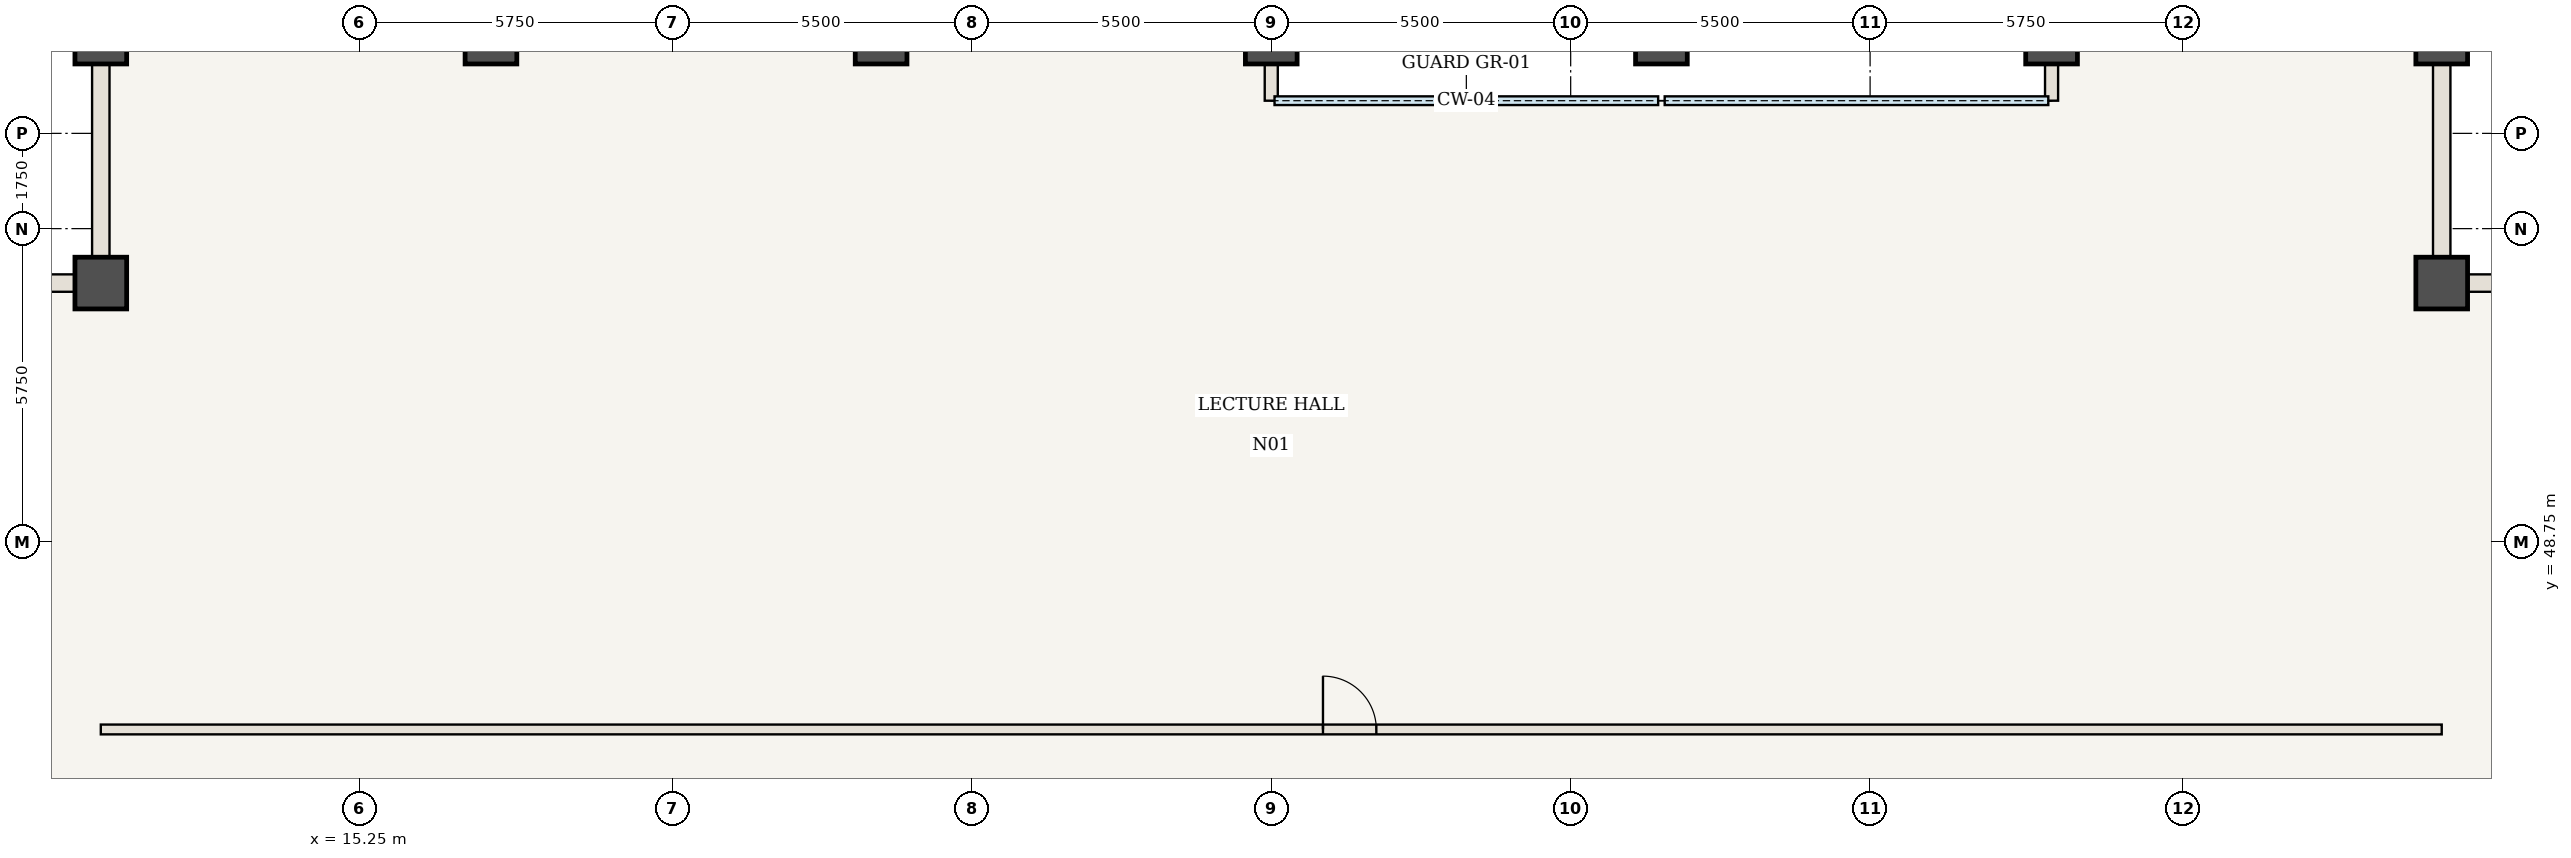
"""IFC4 building model, lengths in metres.
Left out: names, types, materials, properties, quantities, classifications, styles, units other than length and angle.
Written with IfcOpenShell. Run it as: python <this file> out.ifc"""

import sys

from ifc_helpers import new_model, si_unit, direction, frame, frame_2d, origin, origin_2d, place, context, subcontext, project, spatial, rectangle, extrude, element, fill, save


model = new_model("IFC4")
c1 = context("Model", 3, precision=1e-05, world=origin(), true_north=direction((0.0, 1.0)))
c2 = subcontext(c1, "Body", "Model", "MODEL_VIEW")
j1 = project(units=[si_unit("LENGTHUNIT", "METRE"), si_unit("PLANEANGLEUNIT", "RADIAN")], contexts=[c1])
p1 = place(None, origin())
s1 = spatial("IfcSite", under=j1, at=p1, CompositionType="ELEMENT")
p2 = place(p1, origin())
s2 = spatial("IfcBuilding", under=s1, at=p2, CompositionType="ELEMENT")
p3 = place(p2, frame((0.0, 0.0, 133.7)))
s3 = spatial("IfcBuildingStorey", under=s2, at=p3, CompositionType="ELEMENT", Elevation=133.7)
for number, where, z_axis, x_axis in (
    (1, (53.5, 53.5, 0.0), (0.0, 0.0, 1.0), (1.0, 0.0, 0.0)),
    (2, (53.5, 58.0, 0.0), (0.0, 0.0, 1.0), (1.0, 0.0, 0.0)),
    (3, (10.5, 58.0, 0.0), (0.0, 0.0, 1.0), (1.0, 0.0, 0.0)),
    (4, (10.5, 53.5, 0.0), (0.0, 0.0, 1.0), (1.0, 0.0, 0.0)),
    (5, (17.667, 58.0, 0.0), (0.0, 0.0, 1.0), (1.0, 0.0, 0.0)),
    (6, (24.833, 58.0, 0.0), (0.0, 0.0, 1.0), (1.0, 0.0, 0.0)),
    (7, (32.0, 58.0, 0.0), (0.0, 0.0, 1.0), (1.0, 0.0, 0.0)),
    (8, (39.167, 58.0, 0.0), (0.0, 0.0, 1.0), (1.0, 0.0, 0.0)),
    (9, (46.333, 58.0, 0.0), (0.0, 0.0, 1.0), (1.0, 0.0, 0.0)),
):
    element("IfcColumn", number, at=place(p3, frame(where, z_axis=z_axis, x_axis=x_axis)), inside=s3, PredefinedType="COLUMN", context=c2, shape_type="SweptSolid", body=[
        extrude(rectangle(XDim=0.95, YDim=0.95, at=origin_2d()), origin(), (0.0, 0.0, 1.0), 3.85),
    ])
p4 = place(p3, frame((10.5, 45.3, 0.0), z_axis=(0.0, 0.0, 1.0), x_axis=(1.0, 0.0, 0.0)))
e10 = element("IfcWall", 10, at=p4, inside=s3, PredefinedType="STANDARD", context=c2, shape_type="SweptSolid", body=[
    extrude(rectangle(XDim=43.0, YDim=0.18, at=frame_2d((21.5, 0.0))), origin(), (0.0, 0.0, 1.0), 3.685),
])
p5 = place(p4, frame((22.45, 0.0, 0.0)))
e11 = element("IfcOpeningElement", 11, at=p5, cuts=e10, PredefinedType="OPENING", context=c2, shape_type="SweptSolid", body=[
    extrude(rectangle(XDim=0.98, YDim=2.2, at=frame_2d((0.49, 1.1))), frame((0.0, 0.1, 0.0), z_axis=(0.0, -1.0, 0.0), x_axis=(1.0, 0.0, 0.0)), (0.0, 0.0, 1.0), 0.2),
])
for number, where, z_axis, x_axis in (
    (12, (32.0, 58.0, 0.0), (0.0, 0.0, 1.0), (0.0, -1.0, 0.0)),
    (13, (46.333, 58.0, 0.0), (0.0, 0.0, 1.0), (0.0, -1.0, 0.0)),
):
    element("IfcWall", number, at=place(p3, frame(where, z_axis=z_axis, x_axis=x_axis)), inside=s3, PredefinedType="USERDEFINED", context=c2, shape_type="SweptSolid", body=[
        extrude(rectangle(XDim=1.15, YDim=0.24, at=frame_2d((0.575, 0.0))), origin(), (0.0, 0.0, 1.0), 2.885),
    ])
for number, where, z_axis, x_axis in (
    (14, (53.5, 53.5, 0.0), (0.0, 0.0, 1.0), (1.0, 0.0, 0.0)),
    (15, (53.5, 58.0, 0.0), (0.0, 0.0, 1.0), (0.0, -1.0, 0.0)),
    (16, (10.5, 53.5, 0.0), (0.0, 0.0, 1.0), (0.0, 1.0, 0.0)),
    (17, (6.0, 53.5, 0.0), (0.0, 0.0, 1.0), (1.0, 0.0, 0.0)),
):
    element("IfcWall", number, at=place(p3, frame(where, z_axis=z_axis, x_axis=x_axis)), inside=s3, PredefinedType="USERDEFINED", context=c2, shape_type="SweptSolid", body=[
        extrude(rectangle(XDim=4.5, YDim=0.32, at=frame_2d((2.25, 0.0))), origin(), (0.0, 0.0, 1.0), 2.885),
    ])
p6 = place(p5, origin())
e18 = element("IfcDoor", 18, at=p6, inside=s3, OperationType="SINGLE_SWING_LEFT", PredefinedType="DOOR", context=c2, shape_type="SweptSolid", body=[
    extrude(rectangle(XDim=0.98, YDim=2.2, at=frame_2d((0.49, 1.1))), frame((0.0, 0.025, 0.0), z_axis=(0.0, -1.0, 0.0), x_axis=(1.0, 0.0, 0.0)), (0.0, 0.0, 1.0), 0.05),
])
fill(e11, e18)
save(model, sys.argv[1])
